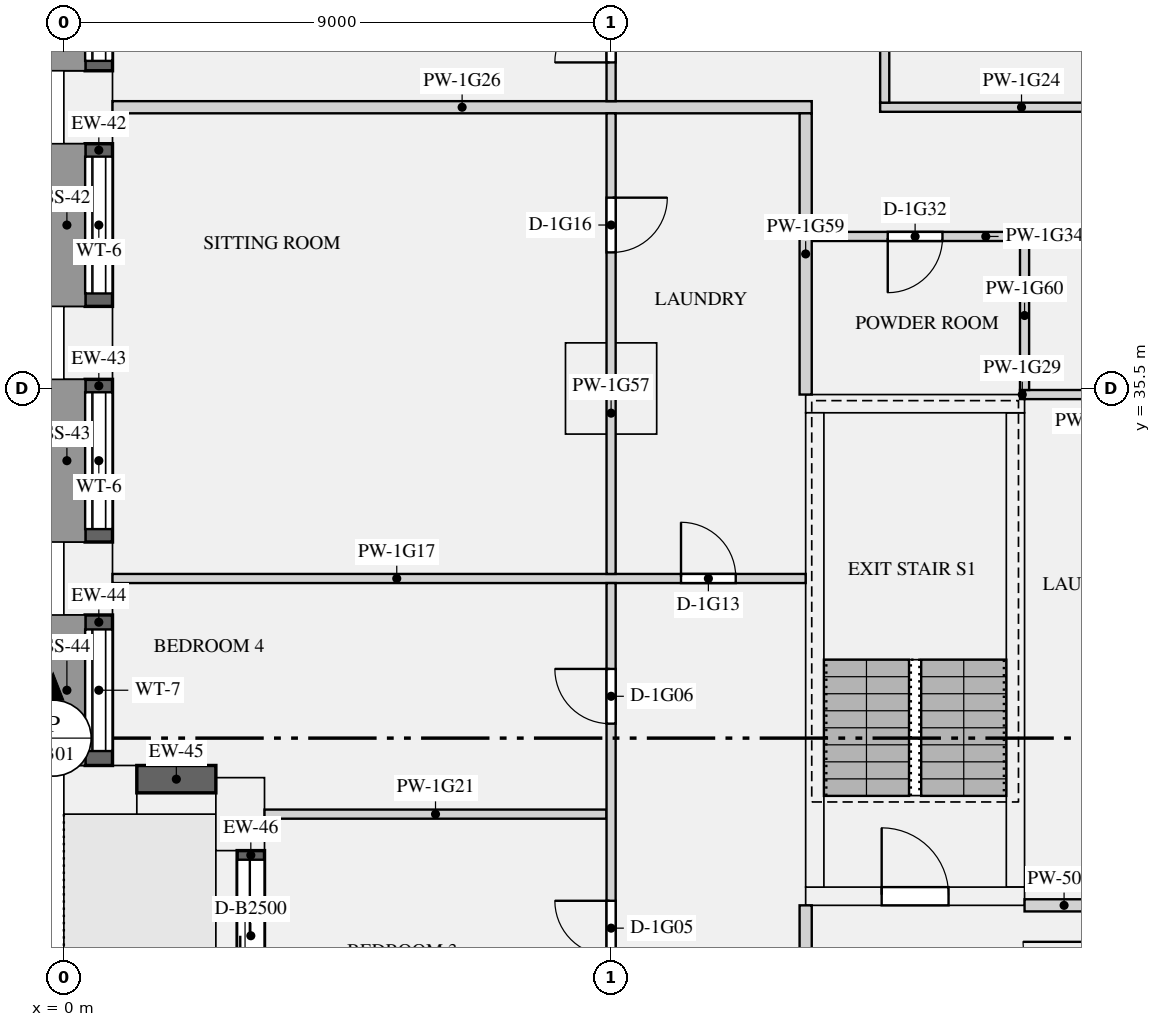
"""IFC4 building model, lengths in metres.
Left out: names, types, materials, properties, quantities, classifications, styles, units other than length and angle.
Written with IfcOpenShell. Run it as: python <this file> out.ifc"""

import sys

from ifc_helpers import new_model, si_unit, direction, frame, frame_2d, origin, origin_2d, place, context, subcontext, project, spatial, rectangle, extrude, element, fill, save


model = new_model("IFC4")
c1 = context("Model", 3, precision=1e-05, world=origin(), true_north=direction((0.0, 1.0)))
c2 = subcontext(c1, "Body", "Model", "MODEL_VIEW")
j1 = project(units=[si_unit("LENGTHUNIT", "METRE"), si_unit("PLANEANGLEUNIT", "RADIAN")], contexts=[c1])
p1 = place(None, origin())
s1 = spatial("IfcSite", under=j1, at=p1, CompositionType="ELEMENT")
p2 = place(p1, origin())
s2 = spatial("IfcBuilding", under=s1, at=p2, CompositionType="ELEMENT")
p3 = place(p2, frame((0.0, 0.0, 69.9)))
s3 = spatial("IfcBuildingStorey", under=s2, at=p3, CompositionType="ELEMENT", Elevation=69.9)
for number, where, z_axis, x_axis in (
    (1, (0.4, 40.125, 0.0), (0.0, 0.0, 1.0), (0.0, -1.0, 0.0)),
    (2, (0.4, 36.25, 0.0), (0.0, 0.0, 1.0), (0.0, -1.0, 0.0)),
    (3, (0.4, 32.375, 0.0), (0.0, 0.0, 1.0), (0.0, -1.0, 0.0)),
    (4, (0.6, 28.9, 0.0), (0.0, 0.0, 1.0), (1.0, 0.0, 0.0)),
    (5, (2.9, 28.5, 0.0), (0.0, 0.0, 1.0), (0.0, -1.0, 0.0)),
):
    element("IfcColumn", number, at=place(p3, frame(where, z_axis=z_axis, x_axis=x_axis)), inside=s3, PredefinedType="USERDEFINED", context=c2, shape_type="SweptSolid", body=[
        extrude(rectangle(XDim=1.2, YDim=0.8, at=origin_2d()), origin(), (0.0, 0.0, 1.0), 2.65),
    ])
p4 = place(p3, frame((9.0, 35.5, 0.0), z_axis=(0.0, 0.0, 1.0), x_axis=(1.0, 0.0, 0.0)))
e6 = element("IfcColumn", 6, at=p4, inside=s3, PredefinedType="COLUMN", context=c2, shape_type="SweptSolid", body=[
    extrude(rectangle(XDim=1.5, YDim=1.5, at=origin_2d()), origin(), (0.0, 0.0, 1.0), 3.15),
])
p5 = place(p3, frame((12.2, 27.15, 0.0), z_axis=(0.0, 0.0, 1.0), x_axis=(1.0, 0.0, 0.0)))
e7 = element("IfcWall", 7, at=p5, inside=s3, PredefinedType="SHEAR", context=c2, shape_type="SweptSolid", body=[
    extrude(rectangle(XDim=3.6, YDim=0.3, at=frame_2d((1.8, 0.0))), origin(), (0.0, 0.0, 1.0), 3.15),
])
p6 = place(p5, frame((1.25, 0.0, 0.0)))
e8 = element("IfcOpeningElement", 8, at=p6, cuts=e7, PredefinedType="OPENING", context=c2, shape_type="SweptSolid", body=[
    extrude(rectangle(XDim=1.1, YDim=2.1, at=frame_2d((0.55, 1.05))), frame((0.0, 0.16, 0.0), z_axis=(0.0, -1.0, 0.0), x_axis=(1.0, 0.0, 0.0)), (0.0, 0.0, 1.0), 0.32),
])
p7 = place(p3, frame((12.2, 35.25, 0.0), z_axis=(0.0, 0.0, 1.0), x_axis=(1.0, 0.0, 0.0)))
e9 = element("IfcWall", 9, at=p7, inside=s3, PredefinedType="SHEAR", context=c2, shape_type="SweptSolid", body=[
    extrude(rectangle(XDim=3.6, YDim=0.3, at=frame_2d((1.8, 0.0))), origin(), (0.0, 0.0, 1.0), 3.15),
])
for number, where, z_axis, x_axis in (
    (10, (12.35, 27.3, 0.0), (0.0, 0.0, 1.0), (0.0, 1.0, 0.0)),
    (11, (15.65, 27.3, 0.0), (0.0, 0.0, 1.0), (0.0, 1.0, 0.0)),
):
    element("IfcWall", number, at=place(p3, frame(where, z_axis=z_axis, x_axis=x_axis)), inside=s3, PredefinedType="SHEAR", context=c2, shape_type="SweptSolid", body=[
        extrude(rectangle(XDim=7.8, YDim=0.3, at=frame_2d((3.9, 0.0))), origin(), (0.0, 0.0, 1.0), 3.15),
    ])
p8 = place(p3, frame((0.575, 42.8, 0.9), z_axis=(0.0, 0.0, 1.0), x_axis=(0.0, -1.0, 0.0)))
e12 = element("IfcWall", 12, at=p8, inside=s3, PredefinedType="SOLIDWALL", context=c2, shape_type="SweptSolid", body=[
    extrude(rectangle(XDim=2.075, YDim=0.45, at=frame_2d((1.038, 0.0))), origin(), (0.0, 0.0, 1.0), 1.75),
])
p9 = place(p8, frame((0.163, 0.0, 0.15)))
e13 = element("IfcOpeningElement", 13, at=p9, cuts=e12, PredefinedType="OPENING", context=c2, shape_type="SweptSolid", body=[
    extrude(rectangle(XDim=1.75, YDim=1.5, at=frame_2d((0.875, 0.75))), frame((0.0, 0.235, 0.0), z_axis=(0.0, -1.0, 0.0), x_axis=(1.0, 0.0, 0.0)), (0.0, 0.0, 1.0), 0.47),
])
p10 = place(p3, frame((0.575, 39.525, 0.9), z_axis=(0.0, 0.0, 1.0), x_axis=(0.0, -1.0, 0.0)))
e14 = element("IfcWall", 14, at=p10, inside=s3, PredefinedType="SOLIDWALL", context=c2, shape_type="SweptSolid", body=[
    extrude(rectangle(XDim=2.675, YDim=0.45, at=frame_2d((1.337, 0.0))), origin(), (0.0, 0.0, 1.0), 1.75),
])
p11 = place(p10, frame((0.212, 0.0, 0.15)))
e15 = element("IfcOpeningElement", 15, at=p11, cuts=e14, PredefinedType="OPENING", context=c2, shape_type="SweptSolid", body=[
    extrude(rectangle(XDim=2.25, YDim=1.5, at=frame_2d((1.125, 0.75))), frame((0.0, 0.235, 0.0), z_axis=(0.0, -1.0, 0.0), x_axis=(1.0, 0.0, 0.0)), (0.0, 0.0, 1.0), 0.47),
])
p12 = place(p3, frame((0.575, 35.65, 0.9), z_axis=(0.0, 0.0, 1.0), x_axis=(0.0, -1.0, 0.0)))
e16 = element("IfcWall", 16, at=p12, inside=s3, PredefinedType="SOLIDWALL", context=c2, shape_type="SweptSolid", body=[
    extrude(rectangle(XDim=2.675, YDim=0.45, at=frame_2d((1.337, 0.0))), origin(), (0.0, 0.0, 1.0), 1.75),
])
p13 = place(p12, frame((0.212, 0.0, 0.15)))
e17 = element("IfcOpeningElement", 17, at=p13, cuts=e16, PredefinedType="OPENING", context=c2, shape_type="SweptSolid", body=[
    extrude(rectangle(XDim=2.25, YDim=1.5, at=frame_2d((1.125, 0.75))), frame((0.0, 0.235, 0.0), z_axis=(0.0, -1.0, 0.0), x_axis=(1.0, 0.0, 0.0)), (0.0, 0.0, 1.0), 0.47),
])
p14 = place(p3, frame((0.575, 31.775, 0.9), z_axis=(0.0, 0.0, 1.0), x_axis=(0.0, -1.0, 0.0)))
e18 = element("IfcWall", 18, at=p14, inside=s3, PredefinedType="SOLIDWALL", context=c2, shape_type="SweptSolid", body=[
    extrude(rectangle(XDim=2.475, YDim=0.45, at=frame_2d((1.237, 0.0))), origin(), (0.0, 0.0, 1.0), 1.75),
])
p15 = place(p14, frame((0.238, 0.0, 0.15)))
e19 = element("IfcOpeningElement", 19, at=p15, cuts=e18, PredefinedType="OPENING", context=c2, shape_type="SweptSolid", body=[
    extrude(rectangle(XDim=2.0, YDim=1.5, at=frame_2d((1.0, 0.75))), frame((0.0, 0.235, 0.0), z_axis=(0.0, -1.0, 0.0), x_axis=(1.0, 0.0, 0.0)), (0.0, 0.0, 1.0), 0.47),
])
p16 = place(p3, frame((1.2, 29.075, 0.9), z_axis=(0.0, 0.0, 1.0), x_axis=(1.0, 0.0, 0.0)))
e20 = element("IfcWall", 20, at=p16, inside=s3, PredefinedType="SOLIDWALL", context=c2, shape_type="SweptSolid", body=[
    extrude(rectangle(XDim=1.3, YDim=0.45, at=frame_2d((0.65, 0.0))), origin(), (0.0, 0.0, 1.0), 1.75),
])
p17 = place(p3, frame((3.075, 27.9, 0.0), z_axis=(0.0, 0.0, 1.0), x_axis=(0.0, -1.0, 0.0)))
e21 = element("IfcWall", 21, at=p17, inside=s3, PredefinedType="SOLIDWALL", context=c2, shape_type="SweptSolid", body=[
    extrude(rectangle(XDim=2.8, YDim=0.45, at=frame_2d((1.4, 0.0))), origin(), (0.0, 0.0, 1.0), 2.65),
])
p18 = place(p17, frame((0.15, 0.0, 0.0)))
e22 = element("IfcOpeningElement", 22, at=p18, cuts=e21, PredefinedType="OPENING", context=c2, shape_type="SweptSolid", body=[
    extrude(rectangle(XDim=2.5, YDim=2.3, at=frame_2d((1.25, 1.15))), frame((0.0, 0.235, 0.0), z_axis=(0.0, -1.0, 0.0), x_axis=(1.0, 0.0, 0.0)), (0.0, 0.0, 1.0), 0.47),
])
p19 = place(p3, frame((15.8, 27.0, 0.0), z_axis=(0.0, 0.0, 1.0), x_axis=(1.0, 0.0, 0.0)))
e23 = element("IfcWall", 23, at=p19, inside=s3, PredefinedType="PARTITIONING", context=c2, shape_type="SweptSolid", body=[
    extrude(rectangle(XDim=1.3, YDim=0.2, at=frame_2d((0.65, 0.0))), origin(), (0.0, 0.0, 1.0), 2.65),
])
p20 = place(p3, frame((12.2, 23.1, 0.0), z_axis=(0.0, 0.0, 1.0), x_axis=(0.0, 1.0, 0.0)))
e24 = element("IfcWall", 24, at=p20, inside=s3, PredefinedType="PARTITIONING", context=c2, shape_type="SweptSolid", body=[
    extrude(rectangle(XDim=3.9, YDim=0.2, at=frame_2d((1.95, 0.0))), origin(), (0.0, 0.0, 1.0), 2.65),
])
p21 = place(p3, frame((0.8, 32.375, 0.0), z_axis=(0.0, 0.0, 1.0), x_axis=(1.0, 0.0, 0.0)))
e25 = element("IfcWall", 25, at=p21, inside=s3, PredefinedType="PARTITIONING", context=c2, shape_type="SweptSolid", body=[
    extrude(rectangle(XDim=11.4, YDim=0.15, at=frame_2d((5.7, 0.0))), origin(), (0.0, 0.0, 1.0), 2.65),
])
p22 = place(p21, frame((9.35, 0.0, 0.0)))
e26 = element("IfcOpeningElement", 26, at=p22, cuts=e25, PredefinedType="OPENING", context=c2, shape_type="SweptSolid", body=[
    extrude(rectangle(XDim=0.9, YDim=2.1, at=frame_2d((0.45, 1.05))), frame((0.0, 0.085, 0.0), z_axis=(0.0, -1.0, 0.0), x_axis=(1.0, 0.0, 0.0)), (0.0, 0.0, 1.0), 0.17),
])
p23 = place(p3, frame((3.3, 28.5, 0.0), z_axis=(0.0, 0.0, 1.0), x_axis=(1.0, 0.0, 0.0)))
e27 = element("IfcWall", 27, at=p23, inside=s3, PredefinedType="PARTITIONING", context=c2, shape_type="SweptSolid", body=[
    extrude(rectangle(XDim=5.625, YDim=0.15, at=frame_2d((2.812, 0.0))), origin(), (0.0, 0.0, 1.0), 2.65),
])
p24 = place(p3, frame((13.425, 40.125, 0.0), z_axis=(0.0, 0.0, 1.0), x_axis=(1.0, 0.0, 0.0)))
e28 = element("IfcWall", 28, at=p24, inside=s3, PredefinedType="PARTITIONING", context=c2, shape_type="SweptSolid", body=[
    extrude(rectangle(XDim=4.65, YDim=0.15, at=frame_2d((2.325, 0.0))), origin(), (0.0, 0.0, 1.0), 2.65),
])
p25 = place(p3, frame((0.8, 40.125, 0.0), z_axis=(0.0, 0.0, 1.0), x_axis=(1.0, 0.0, 0.0)))
e29 = element("IfcWall", 29, at=p25, inside=s3, PredefinedType="PARTITIONING", context=c2, shape_type="SweptSolid", body=[
    extrude(rectangle(XDim=11.5, YDim=0.2, at=frame_2d((5.75, 0.0))), origin(), (0.0, 0.0, 1.0), 2.65),
])
p26 = place(p3, frame((15.725, 35.4, 0.0), z_axis=(0.0, 0.0, 1.0), x_axis=(1.0, 0.0, 0.0)))
e30 = element("IfcWall", 30, at=p26, inside=s3, PredefinedType="PARTITIONING", context=c2, shape_type="SweptSolid", body=[
    extrude(rectangle(XDim=0.075, YDim=0.15, at=frame_2d((0.038, 0.0))), origin(), (0.0, 0.0, 1.0), 2.65),
])
p27 = place(p3, frame((15.8, 35.4, 0.0), z_axis=(0.0, 0.0, 1.0), x_axis=(1.0, 0.0, 0.0)))
e31 = element("IfcWall", 31, at=p27, inside=s3, PredefinedType="PARTITIONING", context=c2, shape_type="SweptSolid", body=[
    extrude(rectangle(XDim=2.275, YDim=0.15, at=frame_2d((1.137, 0.0))), origin(), (0.0, 0.0, 1.0), 2.65),
])
p28 = place(p3, frame((12.3, 38.0, 0.0), z_axis=(0.0, 0.0, 1.0), x_axis=(1.0, 0.0, 0.0)))
e32 = element("IfcWall", 32, at=p28, inside=s3, PredefinedType="PARTITIONING", context=c2, shape_type="SweptSolid", body=[
    extrude(rectangle(XDim=3.575, YDim=0.15, at=frame_2d((1.788, 0.0))), origin(), (0.0, 0.0, 1.0), 2.65),
])
p29 = place(p28, frame((1.25, 0.0, 0.0)))
e33 = element("IfcOpeningElement", 33, at=p29, cuts=e32, PredefinedType="OPENING", context=c2, shape_type="SweptSolid", body=[
    extrude(rectangle(XDim=0.9, YDim=2.1, at=frame_2d((0.45, 1.05))), frame((0.0, 0.085, 0.0), z_axis=(0.0, -1.0, 0.0), x_axis=(1.0, 0.0, 0.0)), (0.0, 0.0, 1.0), 0.17),
])
p30 = place(p3, frame((13.5, 40.2, 0.0), z_axis=(0.0, 0.0, 1.0), x_axis=(0.0, 1.0, 0.0)))
e34 = element("IfcWall", 34, at=p30, inside=s3, PredefinedType="PARTITIONING", context=c2, shape_type="SweptSolid", body=[
    extrude(rectangle(XDim=7.5, YDim=0.15, at=frame_2d((3.75, 0.0))), origin(), (0.0, 0.0, 1.0), 2.65),
])
p31 = place(p30, frame((6.075, 0.0, 0.0)))
e35 = element("IfcOpeningElement", 35, at=p31, cuts=e34, PredefinedType="OPENING", context=c2, shape_type="SweptSolid", body=[
    extrude(rectangle(XDim=0.8, YDim=2.1, at=frame_2d((0.4, 1.05))), frame((0.0, 0.085, 0.0), z_axis=(0.0, -1.0, 0.0), x_axis=(1.0, 0.0, 0.0)), (0.0, 0.0, 1.0), 0.17),
])
p32 = place(p30, frame((3.4, 0.0, 0.0)))
e36 = element("IfcOpeningElement", 36, at=p32, cuts=e34, PredefinedType="OPENING", context=c2, shape_type="SweptSolid", body=[
    extrude(rectangle(XDim=0.8, YDim=2.1, at=frame_2d((0.4, 1.05))), frame((0.0, 0.085, 0.0), z_axis=(0.0, -1.0, 0.0), x_axis=(1.0, 0.0, 0.0)), (0.0, 0.0, 1.0), 0.17),
])
p33 = place(p3, frame((9.0, 20.575, 0.0), z_axis=(0.0, 0.0, 1.0), x_axis=(0.0, 1.0, 0.0)))
e37 = element("IfcWall", 37, at=p33, inside=s3, PredefinedType="PARTITIONING", context=c2, shape_type="SweptSolid", body=[
    extrude(rectangle(XDim=11.725, YDim=0.15, at=frame_2d((5.863, 0.0))), origin(), (0.0, 0.0, 1.0), 2.65),
])
p34 = place(p33, frame((5.6, 0.0, 0.0)))
e38 = element("IfcOpeningElement", 38, at=p34, cuts=e37, PredefinedType="OPENING", context=c2, shape_type="SweptSolid", body=[
    extrude(rectangle(XDim=0.9, YDim=2.1, at=frame_2d((0.45, 1.05))), frame((0.0, 0.085, 0.0), z_axis=(0.0, -1.0, 0.0), x_axis=(1.0, 0.0, 0.0)), (0.0, 0.0, 1.0), 0.17),
])
p35 = place(p33, frame((9.413, 0.0, 0.0)))
e39 = element("IfcOpeningElement", 39, at=p35, cuts=e37, PredefinedType="OPENING", context=c2, shape_type="SweptSolid", body=[
    extrude(rectangle(XDim=0.9, YDim=2.1, at=frame_2d((0.45, 1.05))), frame((0.0, 0.085, 0.0), z_axis=(0.0, -1.0, 0.0), x_axis=(1.0, 0.0, 0.0)), (0.0, 0.0, 1.0), 0.17),
])
p36 = place(p3, frame((9.0, 32.45, 0.0), z_axis=(0.0, 0.0, 1.0), x_axis=(0.0, 1.0, 0.0)))
e40 = element("IfcWall", 40, at=p36, inside=s3, PredefinedType="PARTITIONING", context=c2, shape_type="SweptSolid", body=[
    extrude(rectangle(XDim=7.575, YDim=0.15, at=frame_2d((3.788, 0.0))), origin(), (0.0, 0.0, 1.0), 2.65),
])
p37 = place(p36, frame((5.288, 0.0, 0.0)))
e41 = element("IfcOpeningElement", 41, at=p37, cuts=e40, PredefinedType="OPENING", context=c2, shape_type="SweptSolid", body=[
    extrude(rectangle(XDim=0.9, YDim=2.1, at=frame_2d((0.45, 1.05))), frame((0.0, 0.085, 0.0), z_axis=(0.0, -1.0, 0.0), x_axis=(1.0, 0.0, 0.0)), (0.0, 0.0, 1.0), 0.17),
])
p38 = place(p3, frame((9.0, 40.225, 0.0), z_axis=(0.0, 0.0, 1.0), x_axis=(0.0, 1.0, 0.0)))
e42 = element("IfcWall", 42, at=p38, inside=s3, PredefinedType="PARTITIONING", context=c2, shape_type="SweptSolid", body=[
    extrude(rectangle(XDim=7.475, YDim=0.15, at=frame_2d((3.737, 0.0))), origin(), (0.0, 0.0, 1.0), 2.65),
])
p39 = place(p38, frame((6.05, 0.0, 0.0)))
e43 = element("IfcOpeningElement", 43, at=p39, cuts=e42, PredefinedType="OPENING", context=c2, shape_type="SweptSolid", body=[
    extrude(rectangle(XDim=0.8, YDim=2.1, at=frame_2d((0.4, 1.05))), frame((0.0, 0.085, 0.0), z_axis=(0.0, -1.0, 0.0), x_axis=(1.0, 0.0, 0.0)), (0.0, 0.0, 1.0), 0.17),
])
p40 = place(p38, frame((3.375, 0.0, 0.0)))
e44 = element("IfcOpeningElement", 44, at=p40, cuts=e42, PredefinedType="OPENING", context=c2, shape_type="SweptSolid", body=[
    extrude(rectangle(XDim=0.8, YDim=2.1, at=frame_2d((0.4, 1.05))), frame((0.0, 0.085, 0.0), z_axis=(0.0, -1.0, 0.0), x_axis=(1.0, 0.0, 0.0)), (0.0, 0.0, 1.0), 0.17),
])
p41 = place(p38, frame((0.637, 0.0, 0.0)))
e45 = element("IfcOpeningElement", 45, at=p41, cuts=e42, PredefinedType="OPENING", context=c2, shape_type="SweptSolid", body=[
    extrude(rectangle(XDim=0.9, YDim=2.1, at=frame_2d((0.45, 1.05))), frame((0.0, 0.085, 0.0), z_axis=(0.0, -1.0, 0.0), x_axis=(1.0, 0.0, 0.0)), (0.0, 0.0, 1.0), 0.17),
])
p42 = place(p3, frame((12.2, 35.4, 0.0), z_axis=(0.0, 0.0, 1.0), x_axis=(0.0, 1.0, 0.0)))
e46 = element("IfcWall", 46, at=p42, inside=s3, PredefinedType="PARTITIONING", context=c2, shape_type="SweptSolid", body=[
    extrude(rectangle(XDim=4.625, YDim=0.2, at=frame_2d((2.312, 0.0))), origin(), (0.0, 0.0, 1.0), 2.65),
])
p43 = place(p3, frame((15.8, 35.475, 0.0), z_axis=(0.0, 0.0, 1.0), x_axis=(0.0, 1.0, 0.0)))
e47 = element("IfcWall", 47, at=p43, inside=s3, PredefinedType="PARTITIONING", context=c2, shape_type="SweptSolid", body=[
    extrude(rectangle(XDim=2.45, YDim=0.15, at=frame_2d((1.225, 0.0))), origin(), (0.0, 0.0, 1.0), 2.65),
])
p44 = place(p9, origin())
e48 = element("IfcWindow", 48, at=p44, inside=s3, PartitioningType="SINGLE_PANEL", PredefinedType="WINDOW", context=c2, shape_type="SweptSolid", body=[
    extrude(rectangle(XDim=1.75, YDim=1.5, at=frame_2d((0.875, 0.75))), frame((0.0, -0.065, 0.0), z_axis=(0.0, -1.0, 0.0), x_axis=(1.0, 0.0, 0.0)), (0.0, 0.0, 1.0), 0.06),
])
fill(e13, e48)
p45 = place(p11, origin())
e49 = element("IfcWindow", 49, at=p45, inside=s3, PartitioningType="SINGLE_PANEL", PredefinedType="WINDOW", context=c2, shape_type="SweptSolid", body=[
    extrude(rectangle(XDim=2.25, YDim=1.5, at=frame_2d((1.125, 0.75))), frame((0.0, -0.065, 0.0), z_axis=(0.0, -1.0, 0.0), x_axis=(1.0, 0.0, 0.0)), (0.0, 0.0, 1.0), 0.06),
])
fill(e15, e49)
p46 = place(p13, origin())
e50 = element("IfcWindow", 50, at=p46, inside=s3, PartitioningType="SINGLE_PANEL", PredefinedType="WINDOW", context=c2, shape_type="SweptSolid", body=[
    extrude(rectangle(XDim=2.25, YDim=1.5, at=frame_2d((1.125, 0.75))), frame((0.0, -0.065, 0.0), z_axis=(0.0, -1.0, 0.0), x_axis=(1.0, 0.0, 0.0)), (0.0, 0.0, 1.0), 0.06),
])
fill(e17, e50)
p47 = place(p15, origin())
e51 = element("IfcWindow", 51, at=p47, inside=s3, PartitioningType="SINGLE_PANEL", PredefinedType="WINDOW", context=c2, shape_type="SweptSolid", body=[
    extrude(rectangle(XDim=2.0, YDim=1.5, at=frame_2d((1.0, 0.75))), frame((0.0, -0.065, 0.0), z_axis=(0.0, -1.0, 0.0), x_axis=(1.0, 0.0, 0.0)), (0.0, 0.0, 1.0), 0.06),
])
fill(e19, e51)
p48 = place(p18, origin())
e52 = element("IfcDoor", 52, at=p48, inside=s3, OperationType="SLIDING_TO_LEFT", PredefinedType="DOOR", context=c2, shape_type="SweptSolid", body=[
    extrude(rectangle(XDim=2.5, YDim=2.3, at=frame_2d((1.25, 1.15))), frame((0.0, -0.07, 0.0), z_axis=(0.0, -1.0, 0.0), x_axis=(1.0, 0.0, 0.0)), (0.0, 0.0, 1.0), 0.05),
])
fill(e22, e52)
p49 = place(p6, origin())
e53 = element("IfcDoor", 53, at=p49, inside=s3, OperationType="SINGLE_SWING_LEFT", PredefinedType="DOOR", context=c2, shape_type="SweptSolid", body=[
    extrude(rectangle(XDim=1.1, YDim=2.1, at=frame_2d((0.55, 1.05))), frame((0.0, 0.025, 0.0), z_axis=(0.0, -1.0, 0.0), x_axis=(1.0, 0.0, 0.0)), (0.0, 0.0, 1.0), 0.05),
])
fill(e8, e53)
p50 = place(p34, origin())
e54 = element("IfcDoor", 54, at=p50, inside=s3, OperationType="SINGLE_SWING_RIGHT", PredefinedType="DOOR", context=c2, shape_type="SweptSolid", body=[
    extrude(rectangle(XDim=0.9, YDim=2.1, at=frame_2d((0.45, 1.05))), frame((0.0, 0.025, 0.0), z_axis=(0.0, -1.0, 0.0), x_axis=(1.0, 0.0, 0.0)), (0.0, 0.0, 1.0), 0.05),
])
fill(e38, e54)
p51 = place(p35, origin())
e55 = element("IfcDoor", 55, at=p51, inside=s3, OperationType="SINGLE_SWING_RIGHT", PredefinedType="DOOR", context=c2, shape_type="SweptSolid", body=[
    extrude(rectangle(XDim=0.9, YDim=2.1, at=frame_2d((0.45, 1.05))), frame((0.0, 0.025, 0.0), z_axis=(0.0, -1.0, 0.0), x_axis=(1.0, 0.0, 0.0)), (0.0, 0.0, 1.0), 0.05),
])
fill(e39, e55)
p52 = place(p22, origin())
e56 = element("IfcDoor", 56, at=p52, inside=s3, OperationType="SINGLE_SWING_LEFT", PredefinedType="DOOR", context=c2, shape_type="SweptSolid", body=[
    extrude(rectangle(XDim=0.9, YDim=2.1, at=frame_2d((0.45, 1.05))), frame((0.0, 0.025, 0.0), z_axis=(0.0, -1.0, 0.0), x_axis=(1.0, 0.0, 0.0)), (0.0, 0.0, 1.0), 0.05),
])
fill(e26, e56)
p53 = place(p37, frame((0.9, 0.0, 0.0), z_axis=(0.0, 0.0, 1.0), x_axis=(-1.0, 0.0, 0.0)))
e57 = element("IfcDoor", 57, at=p53, inside=s3, OperationType="SINGLE_SWING_LEFT", PredefinedType="DOOR", context=c2, shape_type="SweptSolid", body=[
    extrude(rectangle(XDim=0.9, YDim=2.1, at=frame_2d((0.45, 1.05))), frame((0.0, 0.025, 0.0), z_axis=(0.0, -1.0, 0.0), x_axis=(1.0, 0.0, 0.0)), (0.0, 0.0, 1.0), 0.05),
])
fill(e41, e57)
p54 = place(p41, origin())
e58 = element("IfcDoor", 58, at=p54, inside=s3, OperationType="SINGLE_SWING_LEFT", PredefinedType="DOOR", context=c2, shape_type="SweptSolid", body=[
    extrude(rectangle(XDim=0.9, YDim=2.1, at=frame_2d((0.45, 1.05))), frame((0.0, 0.025, 0.0), z_axis=(0.0, -1.0, 0.0), x_axis=(1.0, 0.0, 0.0)), (0.0, 0.0, 1.0), 0.05),
])
fill(e45, e58)
p55 = place(p29, frame((0.9, 0.0, 0.0), z_axis=(0.0, 0.0, 1.0), x_axis=(-1.0, 0.0, 0.0)))
e59 = element("IfcDoor", 59, at=p55, inside=s3, OperationType="SINGLE_SWING_RIGHT", PredefinedType="DOOR", context=c2, shape_type="SweptSolid", body=[
    extrude(rectangle(XDim=0.9, YDim=2.1, at=frame_2d((0.45, 1.05))), frame((0.0, 0.025, 0.0), z_axis=(0.0, -1.0, 0.0), x_axis=(1.0, 0.0, 0.0)), (0.0, 0.0, 1.0), 0.05),
])
fill(e33, e59)
save(model, sys.argv[1])
